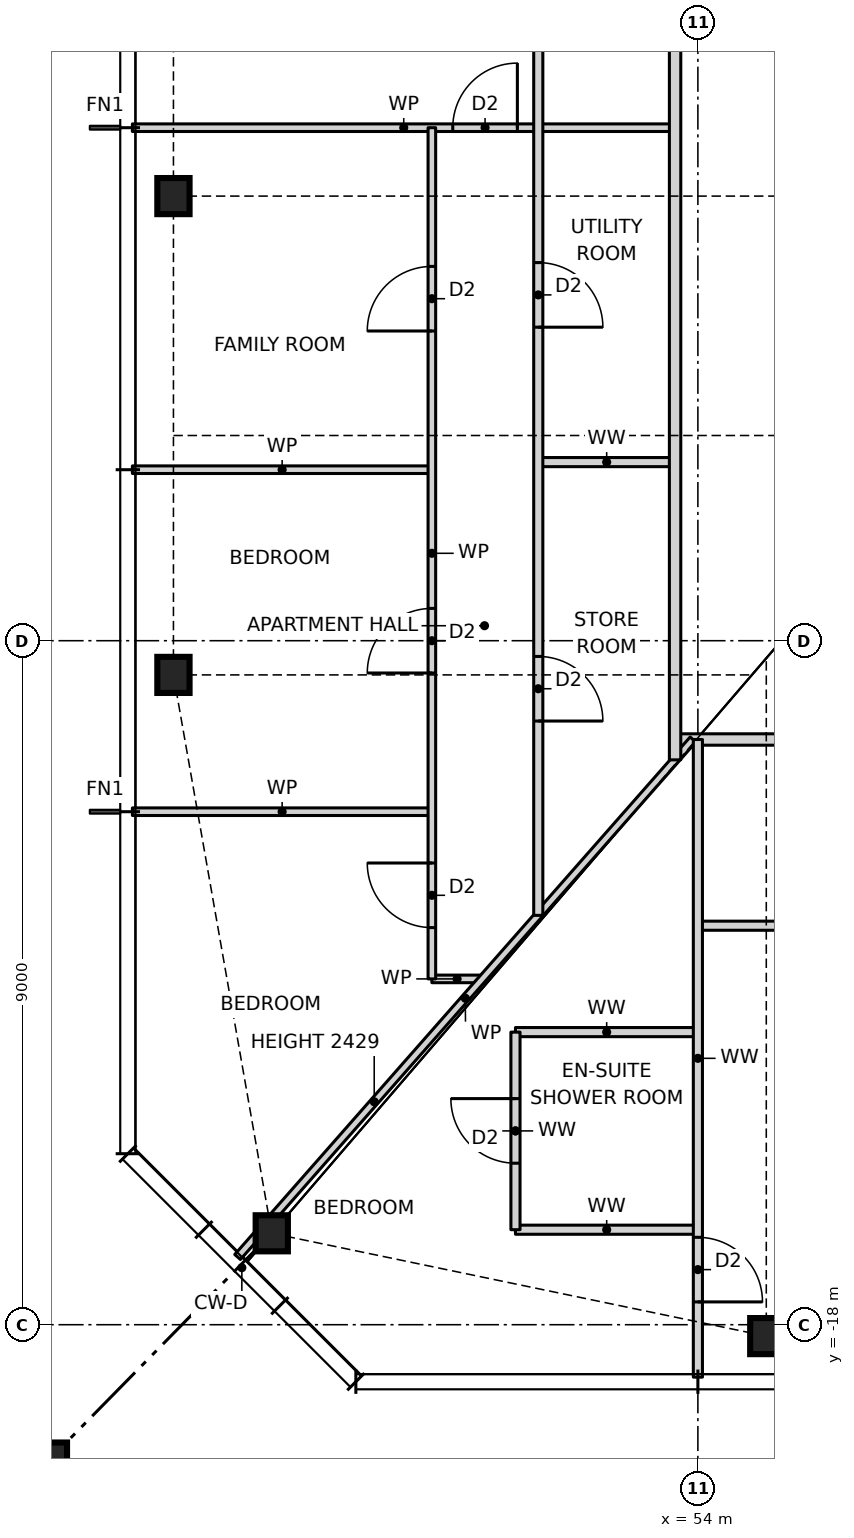
"""IFC4 building model, lengths in metres.
Left out: names, types, materials, properties, quantities, classifications, styles, units other than length and angle.
Written with IfcOpenShell. Run it as: python <this file> out.ifc"""

import sys

from ifc_helpers import new_model, si_unit, direction, frame, frame_2d, origin, origin_2d, place, context, subcontext, project, spatial, rectangle, hollow_rectangle, i_section, extrude, element, fill, save


model = new_model("IFC4")
c1 = context("Model", 3, precision=1e-05, world=origin(), true_north=direction((0.0, 1.0)))
c2 = subcontext(c1, "Body", "Model", "MODEL_VIEW")
j1 = project(units=[si_unit("LENGTHUNIT", "METRE"), si_unit("PLANEANGLEUNIT", "RADIAN")], contexts=[c1])
p1 = place(None, origin())
s1 = spatial("IfcSite", under=j1, at=p1, CompositionType="ELEMENT")
p2 = place(p1, origin())
s2 = spatial("IfcBuilding", under=s1, at=p2, CompositionType="ELEMENT")
p3 = place(p2, frame((0.0, 0.0, 36.0)))
s3 = spatial("IfcBuildingStorey", under=s2, at=p3, CompositionType="ELEMENT", Elevation=36.0)
for number, where, z_axis, x_axis in (
    (1, (48.394, -16.797, 0.0), (0.0, 0.0, 1.0), (1.0, 0.0, 0.0)),
    (2, (54.9, -18.15, 0.0), (0.0, 0.0, 1.0), (1.0, 0.0, 0.0)),
    (3, (47.1, -3.15, 0.0), (0.0, 0.0, 1.0), (1.0, 0.0, 0.0)),
    (4, (47.1, -9.45, 0.0), (0.0, 0.0, 1.0), (1.0, 0.0, 0.0)),
):
    element("IfcColumn", number, at=place(p3, frame(where, z_axis=z_axis, x_axis=x_axis)), inside=s3, PredefinedType="COLUMN", context=c2, shape_type="SweptSolid", body=[
        extrude(i_section(OverallWidth=0.424, OverallDepth=0.475, WebThickness=0.048, FlangeThickness=0.077, at=origin_2d()), origin(), (0.0, 0.0, 1.0), 3.5),
    ])
p4 = place(p3, frame((45.1, -20.15, 0.0), z_axis=(0.0, 0.0, 1.0), x_axis=(1.0, 0.0, 0.0)))
e5 = element("IfcColumn", 5, at=p4, inside=s3, PredefinedType="COLUMN", context=c2, shape_type="SweptSolid", body=[
    extrude(hollow_rectangle(XDim=1.2, YDim=1.2, WallThickness=0.07, at=origin_2d()), origin(), (0.0, 0.0, 1.0), 3.5),
])
for number, where, z_axis, x_axis in (
    (6, (51.6, -16.75, 0.0), (0.0, 0.0, 1.0), (1.0, 0.0, 0.0)),
    (7, (51.6, -14.15, 0.0), (0.0, 0.0, 1.0), (1.0, 0.0, 0.0)),
):
    element("IfcWall", number, at=place(p3, frame(where, z_axis=z_axis, x_axis=x_axis)), inside=s3, PredefinedType="PARTITIONING", context=c2, shape_type="SweptSolid", body=[
        extrude(rectangle(XDim=2.4, YDim=0.12, at=frame_2d((1.2, 0.0))), origin(), (0.0, 0.0, 1.0), 3.27),
    ])
p5 = place(p3, frame((50.5, -13.45, 0.0), z_axis=(0.0, 0.0, 1.0), x_axis=(1.0, 0.0, 0.0)))
e8 = element("IfcWall", 8, at=p5, inside=s3, PredefinedType="PARTITIONING", context=c2, shape_type="SweptSolid", body=[
    extrude(rectangle(XDim=0.664, YDim=0.1, at=frame_2d((0.332, 0.0))), origin(), (0.0, 0.0, 1.0), 3.27),
])
p6 = place(p3, frame((54.0, -12.75, 0.0), z_axis=(0.0, 0.0, 1.0), x_axis=(1.0, 0.0, 0.0)))
e9 = element("IfcWall", 9, at=p6, inside=s3, PredefinedType="PARTITIONING", context=c2, shape_type="SweptSolid", body=[
    extrude(rectangle(XDim=20.2, YDim=0.12, at=frame_2d((10.1, 0.0))), origin(), (0.0, 0.0, 1.0), 3.27),
])
p7 = place(p6, frame((1.375, 0.0, 0.0)))
e10 = element("IfcOpeningElement", 10, at=p7, cuts=e9, PredefinedType="OPENING", context=c2, shape_type="SweptSolid", body=[
    extrude(rectangle(XDim=0.85, YDim=2.1, at=frame_2d((0.425, 1.05))), frame((0.0, 0.07, 0.0), z_axis=(0.0, -1.0, 0.0), x_axis=(1.0, 0.0, 0.0)), (0.0, 0.0, 1.0), 0.14),
])
p8 = place(p6, frame((4.575, 0.0, 0.0)))
e11 = element("IfcOpeningElement", 11, at=p8, cuts=e9, PredefinedType="OPENING", context=c2, shape_type="SweptSolid", body=[
    extrude(rectangle(XDim=0.85, YDim=2.1, at=frame_2d((0.425, 1.05))), frame((0.0, 0.07, 0.0), z_axis=(0.0, -1.0, 0.0), x_axis=(1.0, 0.0, 0.0)), (0.0, 0.0, 1.0), 0.14),
])
p9 = place(p6, frame((10.225, 0.0, 0.0)))
e12 = element("IfcOpeningElement", 12, at=p9, cuts=e9, PredefinedType="OPENING", context=c2, shape_type="SweptSolid", body=[
    extrude(rectangle(XDim=0.85, YDim=2.1, at=frame_2d((0.425, 1.05))), frame((0.0, 0.07, 0.0), z_axis=(0.0, -1.0, 0.0), x_axis=(1.0, 0.0, 0.0)), (0.0, 0.0, 1.0), 0.14),
])
p10 = place(p6, frame((15.825, 0.0, 0.0)))
e13 = element("IfcOpeningElement", 13, at=p10, cuts=e9, PredefinedType="OPENING", context=c2, shape_type="SweptSolid", body=[
    extrude(rectangle(XDim=0.85, YDim=2.1, at=frame_2d((0.425, 1.05))), frame((0.0, 0.07, 0.0), z_axis=(0.0, -1.0, 0.0), x_axis=(1.0, 0.0, 0.0)), (0.0, 0.0, 1.0), 0.14),
])
p11 = place(p3, frame((46.56, -11.25, 0.0), z_axis=(0.0, 0.0, 1.0), x_axis=(1.0, 0.0, 0.0)))
e14 = element("IfcWall", 14, at=p11, inside=s3, PredefinedType="PARTITIONING", context=c2, shape_type="SweptSolid", body=[
    extrude(rectangle(XDim=3.94, YDim=0.1, at=frame_2d((1.97, 0.0))), origin(), (0.0, 0.0, 1.0), 3.27),
])
p12 = place(p3, frame((53.7, -10.3, 0.0), z_axis=(0.0, 0.0, 1.0), x_axis=(1.0, 0.0, 0.0)))
e15 = element("IfcWall", 15, at=p12, inside=s3, PredefinedType="PARTITIONING", context=c2, shape_type="SweptSolid", body=[
    extrude(rectangle(XDim=18.6, YDim=0.15, at=frame_2d((9.3, 0.0))), origin(), (0.0, 0.0, 1.0), 3.27),
])
p13 = place(p12, frame((4.8, 0.0, 0.0)))
e16 = element("IfcOpeningElement", 16, at=p13, cuts=e15, PredefinedType="OPENING", context=c2, shape_type="SweptSolid", body=[
    extrude(rectangle(XDim=1.0, YDim=2.1, at=frame_2d((0.5, 1.05))), frame((0.0, 0.085, 0.0), z_axis=(0.0, -1.0, 0.0), x_axis=(1.0, 0.0, 0.0)), (0.0, 0.0, 1.0), 0.17),
])
p14 = place(p3, frame((46.56, -6.75, 0.0), z_axis=(0.0, 0.0, 1.0), x_axis=(1.0, 0.0, 0.0)))
e17 = element("IfcWall", 17, at=p14, inside=s3, PredefinedType="PARTITIONING", context=c2, shape_type="SweptSolid", body=[
    extrude(rectangle(XDim=3.94, YDim=0.1, at=frame_2d((1.97, 0.0))), origin(), (0.0, 0.0, 1.0), 3.27),
])
p15 = place(p3, frame((51.9, -6.65, 0.0), z_axis=(0.0, 0.0, 1.0), x_axis=(1.0, 0.0, 0.0)))
e18 = element("IfcWall", 18, at=p15, inside=s3, PredefinedType="PARTITIONING", context=c2, shape_type="SweptSolid", body=[
    extrude(rectangle(XDim=1.8, YDim=0.12, at=frame_2d((0.9, 0.0))), origin(), (0.0, 0.0, 1.0), 3.27),
])
p16 = place(p3, frame((46.56, -2.25, 0.0), z_axis=(0.0, 0.0, 1.0), x_axis=(1.0, 0.0, 0.0)))
e19 = element("IfcWall", 19, at=p16, inside=s3, PredefinedType="PARTITIONING", context=c2, shape_type="SweptSolid", body=[
    extrude(rectangle(XDim=7.14, YDim=0.1, at=frame_2d((3.57, 0.0))), origin(), (0.0, 0.0, 1.0), 3.27),
])
p17 = place(p16, frame((4.215, 0.0, 0.0)))
e20 = element("IfcOpeningElement", 20, at=p17, cuts=e19, PredefinedType="OPENING", context=c2, shape_type="SweptSolid", body=[
    extrude(rectangle(XDim=0.85, YDim=2.1, at=frame_2d((0.425, 1.05))), frame((0.0, 0.06, 0.0), z_axis=(0.0, -1.0, 0.0), x_axis=(1.0, 0.0, 0.0)), (0.0, 0.0, 1.0), 0.12),
])
p18 = place(p3, frame((47.944, -17.109, 0.0), z_axis=(0.0, 0.0, 1.0), x_axis=(0.660638210404, 0.750704439146, 0.0)))
e21 = element("IfcWall", 21, at=p18, inside=s3, PredefinedType="PARTITIONING", context=c2, shape_type="SweptSolid", body=[
    extrude(rectangle(XDim=9.07, YDim=0.1, at=frame_2d((4.535, 0.0))), origin(), (0.0, 0.0, 1.0), 2.429),
])
p19 = place(p3, frame((54.0, -18.69, 0.0), z_axis=(0.0, 0.0, 1.0), x_axis=(0.0, 1.0, 0.0)))
e22 = element("IfcWall", 22, at=p19, inside=s3, PredefinedType="PARTITIONING", context=c2, shape_type="SweptSolid", body=[
    extrude(rectangle(XDim=8.39, YDim=0.12, at=frame_2d((4.195, 0.0))), origin(), (0.0, 0.0, 1.0), 3.27),
])
p20 = place(p19, frame((0.99, 0.0, 0.0)))
e23 = element("IfcOpeningElement", 23, at=p20, cuts=e22, PredefinedType="OPENING", context=c2, shape_type="SweptSolid", body=[
    extrude(rectangle(XDim=0.85, YDim=2.1, at=frame_2d((0.425, 1.05))), frame((0.0, 0.07, 0.0), z_axis=(0.0, -1.0, 0.0), x_axis=(1.0, 0.0, 0.0)), (0.0, 0.0, 1.0), 0.14),
])
p21 = place(p3, frame((53.7, -10.568, 0.0), z_axis=(0.0, 0.0, 1.0), x_axis=(0.0, 1.0, 0.0)))
e24 = element("IfcWall", 24, at=p21, inside=s3, PredefinedType="PARTITIONING", context=c2, shape_type="SweptSolid", body=[
    extrude(rectangle(XDim=21.468, YDim=0.15, at=frame_2d((10.734, 0.0))), origin(), (0.0, 0.0, 1.0), 3.27),
])
p22 = place(p21, frame((11.818, 0.0, 0.0)))
e25 = element("IfcOpeningElement", 25, at=p22, cuts=e24, PredefinedType="OPENING", context=c2, shape_type="SweptSolid", body=[
    extrude(rectangle(XDim=1.0, YDim=2.1, at=frame_2d((0.5, 1.05))), frame((0.0, 0.085, 0.0), z_axis=(0.0, -1.0, 0.0), x_axis=(1.0, 0.0, 0.0)), (0.0, 0.0, 1.0), 0.17),
])
p23 = place(p3, frame((51.9, -12.614, 0.0), z_axis=(0.0, 0.0, 1.0), x_axis=(0.0, 1.0, 0.0)))
e26 = element("IfcWall", 26, at=p23, inside=s3, PredefinedType="PARTITIONING", context=c2, shape_type="SweptSolid", body=[
    extrude(rectangle(XDim=25.228, YDim=0.12, at=frame_2d((12.614, 0.0))), origin(), (0.0, 0.0, 1.0), 3.27),
])
p24 = place(p23, frame((17.139, 0.0, 0.0)))
e27 = element("IfcOpeningElement", 27, at=p24, cuts=e26, PredefinedType="OPENING", context=c2, shape_type="SweptSolid", body=[
    extrude(rectangle(XDim=0.85, YDim=2.1, at=frame_2d((0.425, 1.05))), frame((0.0, 0.07, 0.0), z_axis=(0.0, -1.0, 0.0), x_axis=(1.0, 0.0, 0.0)), (0.0, 0.0, 1.0), 0.14),
])
p25 = place(p23, frame((13.939, 0.0, 0.0)))
e28 = element("IfcOpeningElement", 28, at=p25, cuts=e26, PredefinedType="OPENING", context=c2, shape_type="SweptSolid", body=[
    extrude(rectangle(XDim=0.85, YDim=2.1, at=frame_2d((0.425, 1.05))), frame((0.0, 0.07, 0.0), z_axis=(0.0, -1.0, 0.0), x_axis=(1.0, 0.0, 0.0)), (0.0, 0.0, 1.0), 0.14),
])
p26 = place(p23, frame((21.871, 0.0, 0.0)))
e29 = element("IfcOpeningElement", 29, at=p26, cuts=e26, PredefinedType="OPENING", context=c2, shape_type="SweptSolid", body=[
    extrude(rectangle(XDim=0.85, YDim=2.1, at=frame_2d((0.425, 1.05))), frame((0.0, 0.07, 0.0), z_axis=(0.0, -1.0, 0.0), x_axis=(1.0, 0.0, 0.0)), (0.0, 0.0, 1.0), 0.14),
])
p27 = place(p23, frame((7.739, 0.0, 0.0)))
e30 = element("IfcOpeningElement", 30, at=p27, cuts=e26, PredefinedType="OPENING", context=c2, shape_type="SweptSolid", body=[
    extrude(rectangle(XDim=0.85, YDim=2.1, at=frame_2d((0.425, 1.05))), frame((0.0, 0.07, 0.0), z_axis=(0.0, -1.0, 0.0), x_axis=(1.0, 0.0, 0.0)), (0.0, 0.0, 1.0), 0.14),
])
p28 = place(p23, frame((2.557, 0.0, 0.0)))
e31 = element("IfcOpeningElement", 31, at=p28, cuts=e26, PredefinedType="OPENING", context=c2, shape_type="SweptSolid", body=[
    extrude(rectangle(XDim=0.85, YDim=2.1, at=frame_2d((0.425, 1.05))), frame((0.0, 0.07, 0.0), z_axis=(0.0, -1.0, 0.0), x_axis=(1.0, 0.0, 0.0)), (0.0, 0.0, 1.0), 0.14),
])
p29 = place(p3, frame((51.6, -16.75, 0.0), z_axis=(0.0, 0.0, 1.0), x_axis=(0.0, 1.0, 0.0)))
e32 = element("IfcWall", 32, at=p29, inside=s3, PredefinedType="PARTITIONING", context=c2, shape_type="SweptSolid", body=[
    extrude(rectangle(XDim=2.6, YDim=0.12, at=frame_2d((1.3, 0.0))), origin(), (0.0, 0.0, 1.0), 3.27),
])
p30 = place(p29, frame((0.875, 0.0, 0.0)))
e33 = element("IfcOpeningElement", 33, at=p30, cuts=e32, PredefinedType="OPENING", context=c2, shape_type="SweptSolid", body=[
    extrude(rectangle(XDim=0.85, YDim=2.1, at=frame_2d((0.425, 1.05))), frame((0.0, 0.07, 0.0), z_axis=(0.0, -1.0, 0.0), x_axis=(1.0, 0.0, 0.0)), (0.0, 0.0, 1.0), 0.14),
])
p31 = place(p3, frame((50.5, -13.45, 0.0), z_axis=(0.0, 0.0, 1.0), x_axis=(0.0, 1.0, 0.0)))
e34 = element("IfcWall", 34, at=p31, inside=s3, PredefinedType="PARTITIONING", context=c2, shape_type="SweptSolid", body=[
    extrude(rectangle(XDim=11.2, YDim=0.1, at=frame_2d((5.6, 0.0))), origin(), (0.0, 0.0, 1.0), 3.27),
])
p32 = place(p31, frame((8.525, 0.0, 0.0)))
e35 = element("IfcOpeningElement", 35, at=p32, cuts=e34, PredefinedType="OPENING", context=c2, shape_type="SweptSolid", body=[
    extrude(rectangle(XDim=0.85, YDim=2.1, at=frame_2d((0.425, 1.05))), frame((0.0, 0.06, 0.0), z_axis=(0.0, -1.0, 0.0), x_axis=(1.0, 0.0, 0.0)), (0.0, 0.0, 1.0), 0.12),
])
p33 = place(p31, frame((4.025, 0.0, 0.0)))
e36 = element("IfcOpeningElement", 36, at=p33, cuts=e34, PredefinedType="OPENING", context=c2, shape_type="SweptSolid", body=[
    extrude(rectangle(XDim=0.85, YDim=2.1, at=frame_2d((0.425, 1.05))), frame((0.0, 0.06, 0.0), z_axis=(0.0, -1.0, 0.0), x_axis=(1.0, 0.0, 0.0)), (0.0, 0.0, 1.0), 0.12),
])
p34 = place(p31, frame((0.675, 0.0, 0.0)))
e37 = element("IfcOpeningElement", 37, at=p34, cuts=e34, PredefinedType="OPENING", context=c2, shape_type="SweptSolid", body=[
    extrude(rectangle(XDim=0.85, YDim=2.1, at=frame_2d((0.425, 1.05))), frame((0.0, 0.06, 0.0), z_axis=(0.0, -1.0, 0.0), x_axis=(1.0, 0.0, 0.0)), (0.0, 0.0, 1.0), 0.12),
])
p35 = place(p30, origin())
e38 = element("IfcDoor", 38, at=p35, inside=s3, OperationType="SINGLE_SWING_RIGHT", PredefinedType="DOOR", context=c2, shape_type="SweptSolid", body=[
    extrude(rectangle(XDim=0.85, YDim=2.1, at=frame_2d((0.425, 1.05))), frame((0.0, 0.025, 0.0), z_axis=(0.0, -1.0, 0.0), x_axis=(1.0, 0.0, 0.0)), (0.0, 0.0, 1.0), 0.05),
])
fill(e33, e38)
p36 = place(p20, frame((0.85, 0.0, 0.0), z_axis=(0.0, 0.0, 1.0), x_axis=(-1.0, 0.0, 0.0)))
e39 = element("IfcDoor", 39, at=p36, inside=s3, OperationType="SINGLE_SWING_RIGHT", PredefinedType="DOOR", context=c2, shape_type="SweptSolid", body=[
    extrude(rectangle(XDim=0.85, YDim=2.1, at=frame_2d((0.425, 1.05))), frame((0.0, 0.025, 0.0), z_axis=(0.0, -1.0, 0.0), x_axis=(1.0, 0.0, 0.0)), (0.0, 0.0, 1.0), 0.05),
])
fill(e23, e39)
p37 = place(p17, origin())
e40 = element("IfcDoor", 40, at=p37, inside=s3, OperationType="SINGLE_SWING_RIGHT", PredefinedType="DOOR", context=c2, shape_type="SweptSolid", body=[
    extrude(rectangle(XDim=0.85, YDim=2.1, at=frame_2d((0.425, 1.05))), frame((0.0, 0.025, 0.0), z_axis=(0.0, -1.0, 0.0), x_axis=(1.0, 0.0, 0.0)), (0.0, 0.0, 1.0), 0.05),
])
fill(e20, e40)
p38 = place(p32, origin())
e41 = element("IfcDoor", 41, at=p38, inside=s3, OperationType="SINGLE_SWING_LEFT", PredefinedType="DOOR", context=c2, shape_type="SweptSolid", body=[
    extrude(rectangle(XDim=0.85, YDim=2.1, at=frame_2d((0.425, 1.05))), frame((0.0, 0.025, 0.0), z_axis=(0.0, -1.0, 0.0), x_axis=(1.0, 0.0, 0.0)), (0.0, 0.0, 1.0), 0.05),
])
fill(e35, e41)
p39 = place(p33, origin())
e42 = element("IfcDoor", 42, at=p39, inside=s3, OperationType="SINGLE_SWING_LEFT", PredefinedType="DOOR", context=c2, shape_type="SweptSolid", body=[
    extrude(rectangle(XDim=0.85, YDim=2.1, at=frame_2d((0.425, 1.05))), frame((0.0, 0.025, 0.0), z_axis=(0.0, -1.0, 0.0), x_axis=(1.0, 0.0, 0.0)), (0.0, 0.0, 1.0), 0.05),
])
fill(e36, e42)
p40 = place(p34, origin())
e43 = element("IfcDoor", 43, at=p40, inside=s3, OperationType="SINGLE_SWING_RIGHT", PredefinedType="DOOR", context=c2, shape_type="SweptSolid", body=[
    extrude(rectangle(XDim=0.85, YDim=2.1, at=frame_2d((0.425, 1.05))), frame((0.0, 0.025, 0.0), z_axis=(0.0, -1.0, 0.0), x_axis=(1.0, 0.0, 0.0)), (0.0, 0.0, 1.0), 0.05),
])
fill(e37, e43)
p41 = place(p27, frame((0.85, 0.0, 0.0), z_axis=(0.0, 0.0, 1.0), x_axis=(-1.0, 0.0, 0.0)))
e44 = element("IfcDoor", 44, at=p41, inside=s3, OperationType="SINGLE_SWING_RIGHT", PredefinedType="DOOR", context=c2, shape_type="SweptSolid", body=[
    extrude(rectangle(XDim=0.85, YDim=2.1, at=frame_2d((0.425, 1.05))), frame((0.0, 0.025, 0.0), z_axis=(0.0, -1.0, 0.0), x_axis=(1.0, 0.0, 0.0)), (0.0, 0.0, 1.0), 0.05),
])
fill(e30, e44)
p42 = place(p28, frame((0.85, 0.0, 0.0), z_axis=(0.0, 0.0, 1.0), x_axis=(-1.0, 0.0, 0.0)))
e45 = element("IfcDoor", 45, at=p42, inside=s3, OperationType="SINGLE_SWING_RIGHT", PredefinedType="DOOR", context=c2, shape_type="SweptSolid", body=[
    extrude(rectangle(XDim=0.85, YDim=2.1, at=frame_2d((0.425, 1.05))), frame((0.0, 0.025, 0.0), z_axis=(0.0, -1.0, 0.0), x_axis=(1.0, 0.0, 0.0)), (0.0, 0.0, 1.0), 0.05),
])
fill(e31, e45)
save(model, sys.argv[1])
